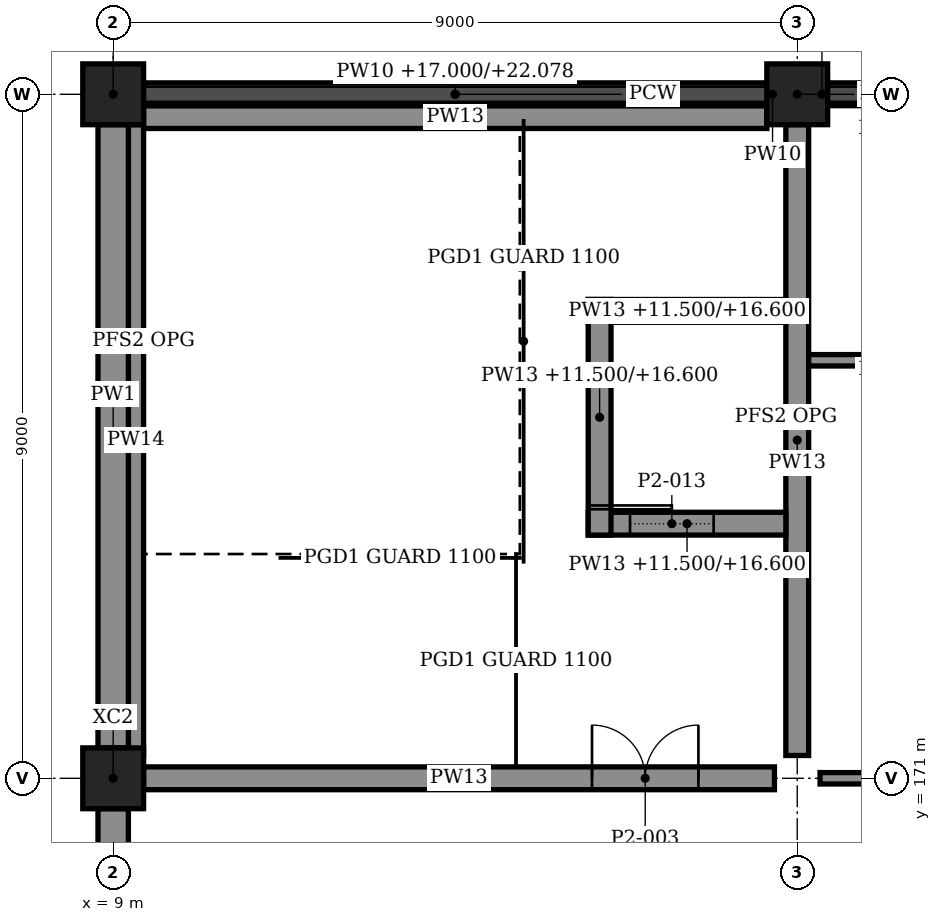
"""IFC4 building model, lengths in metres.
Left out: names, types, materials, properties, quantities, classifications, styles, units other than length and angle.
Written with IfcOpenShell. Run it as: python <this file> out.ifc"""

import sys

from ifc_helpers import new_model, si_unit, direction, frame, frame_2d, origin, origin_2d, place, context, subcontext, project, spatial, polyline, rectangle, outline, extrude, element, fill, save


model = new_model("IFC4")
c1 = context("Model", 3, precision=1e-05, world=origin(), true_north=direction((0.0, 1.0)))
c2 = subcontext(c1, "Body", "Model", "MODEL_VIEW")
j1 = project(units=[si_unit("LENGTHUNIT", "METRE"), si_unit("PLANEANGLEUNIT", "RADIAN")], contexts=[c1])
p1 = place(None, origin())
s1 = spatial("IfcSite", under=j1, at=p1, CompositionType="ELEMENT")
p2 = place(p1, origin())
s2 = spatial("IfcBuilding", under=s1, at=p2, CompositionType="ELEMENT")
p3 = place(p2, frame((0.0, 0.0, 11.5)))
s3 = spatial("IfcBuildingStorey", under=s2, at=p3, CompositionType="ELEMENT", Elevation=11.5)
for number, where, z_axis, x_axis in (
    (1, (9.0, 171.0, 0.0), (0.0, 0.0, 1.0), (1.0, 0.0, 0.0)),
    (2, (9.0, 180.0, 0.0), (0.0, 0.0, 1.0), (1.0, 0.0, 0.0)),
    (3, (18.0, 180.0, 0.0), (0.0, 0.0, 1.0), (1.0, 0.0, 0.0)),
):
    element("IfcColumn", number, at=place(p3, frame(where, z_axis=z_axis, x_axis=x_axis)), inside=s3, PredefinedType="COLUMN", context=c2, shape_type="SweptSolid", body=[
        extrude(rectangle(XDim=0.8, YDim=0.8, at=origin_2d()), origin(), (0.0, 0.0, 1.0), 5.5),
    ])
p4 = place(p3, frame((9.0, 162.4, 0.0), z_axis=(0.0, 0.0, 1.0), x_axis=(0.0, 1.0, 0.0)))
e4 = element("IfcWall", 4, at=p4, inside=s3, PredefinedType="SOLIDWALL", context=c2, shape_type="SweptSolid", body=[
    extrude(outline(polyline([(0.0, 0.0), (8.2, 0.0), (8.2, 6.936), (0.0, 4.776), (0.0, 0.0)])), frame((0.0, 0.2, 0.0), z_axis=(0.0, -1.0, 0.0), x_axis=(1.0, 0.0, 0.0)), (0.0, 0.0, 1.0), 0.4),
])
p5 = place(p3, frame((9.0, 171.4, 0.0), z_axis=(0.0, 0.0, 1.0), x_axis=(0.0, 1.0, 0.0)))
e5 = element("IfcWall", 5, at=p5, inside=s3, PredefinedType="SOLIDWALL", context=c2, shape_type="SweptSolid", body=[
    extrude(outline(polyline([(0.0, 0.0), (8.2, 0.0), (8.2, 10.313), (0.0, 7.061), (0.0, 0.0)])), frame((0.0, 0.2, 0.0), z_axis=(0.0, -1.0, 0.0), x_axis=(1.0, 0.0, 0.0)), (0.0, 0.0, 1.0), 0.4),
])
p6 = place(p3, frame((9.4, 180.0, 5.5), z_axis=(0.0, 0.0, 1.0), x_axis=(1.0, 0.0, 0.0)))
e6 = element("IfcWall", 6, at=p6, inside=s3, PredefinedType="STANDARD", context=c2, shape_type="SweptSolid", body=[
    extrude(outline(polyline([(0.0, 0.0), (8.2, 0.0), (8.2, 8.316), (0.0, 5.078), (0.0, 0.0)])), frame((0.0, 0.15, 0.0), z_axis=(0.0, -1.0, 0.0), x_axis=(1.0, 0.0, 0.0)), (0.0, 0.0, 1.0), 0.3),
])
p7 = place(p3, frame((17.6, 180.0, 13.969), z_axis=(0.0, 0.0, 1.0), x_axis=(1.0, 0.0, 0.0)))
e7 = element("IfcWall", 7, at=p7, inside=s3, PredefinedType="STANDARD", context=c2, shape_type="SweptSolid", body=[
    extrude(rectangle(XDim=0.15, YDim=0.3, at=frame_2d((0.075, 0.0))), origin(), (0.0, 0.0, 1.0), 0.4),
])
p8 = place(p3, frame((18.4, 180.0, 5.5), z_axis=(0.0, 0.0, 1.0), x_axis=(1.0, 0.0, 0.0)))
e8 = element("IfcWall", 8, at=p8, inside=s3, PredefinedType="STANDARD", context=c2, shape_type="SweptSolid", body=[
    extrude(outline(polyline([(0.0, 0.0), (8.2, 0.0), (8.2, 10.653), (0.0, 8.494), (0.0, 0.0)])), frame((0.0, 0.15, 0.0), z_axis=(0.0, -1.0, 0.0), x_axis=(1.0, 0.0, 0.0)), (0.0, 0.0, 1.0), 0.3),
])
p9 = place(p3, frame((18.25, 180.0, 13.969), z_axis=(0.0, 0.0, 1.0), x_axis=(1.0, 0.0, 0.0)))
e9 = element("IfcWall", 9, at=p9, inside=s3, PredefinedType="STANDARD", context=c2, shape_type="SweptSolid", body=[
    extrude(rectangle(XDim=0.15, YDim=0.3, at=frame_2d((0.075, 0.0))), origin(), (0.0, 0.0, 1.0), 0.4),
])
p10 = place(p3, frame((18.0, 171.3, 0.0), z_axis=(0.0, 0.0, 1.0), x_axis=(0.0, 1.0, 0.0)))
e10 = element("IfcWall", 10, at=p10, inside=s3, PredefinedType="SOLIDWALL", context=c2, shape_type="SweptSolid", body=[
    extrude(rectangle(XDim=8.3, YDim=0.3, at=frame_2d((4.15, 0.0))), origin(), (0.0, 0.0, 1.0), 2.5),
])
p11 = place(p3, frame((9.4, 171.0, 0.0), z_axis=(0.0, 0.0, 1.0), x_axis=(1.0, 0.0, 0.0)))
e11 = element("IfcWall", 11, at=p11, inside=s3, PredefinedType="SOLIDWALL", context=c2, shape_type="SweptSolid", body=[
    extrude(rectangle(XDim=8.3, YDim=0.3, at=frame_2d((4.15, 0.0))), origin(), (0.0, 0.0, 1.0), 2.5),
])
p12 = place(p11, frame((5.9, 0.0, 0.0)))
e12 = element("IfcOpeningElement", 12, at=p12, cuts=e11, PredefinedType="OPENING", context=c2, shape_type="SweptSolid", body=[
    extrude(rectangle(XDim=1.4, YDim=2.4, at=frame_2d((0.7, 1.2))), frame((0.0, 0.16, 0.0), z_axis=(0.0, -1.0, 0.0), x_axis=(1.0, 0.0, 0.0)), (0.0, 0.0, 1.0), 0.32),
])
p13 = place(p3, frame((9.3, 171.3, 0.0), z_axis=(0.0, 0.0, 1.0), x_axis=(0.0, 1.0, 0.0)))
e13 = element("IfcWall", 13, at=p13, inside=s3, PredefinedType="SOLIDWALL", context=c2, shape_type="SweptSolid", body=[
    extrude(rectangle(XDim=8.3, YDim=0.2, at=frame_2d((4.15, 0.0))), origin(), (0.0, 0.0, 1.0), 2.5),
])
p14 = place(p3, frame((9.4, 179.7, 0.0), z_axis=(0.0, 0.0, 1.0), x_axis=(1.0, 0.0, 0.0)))
e14 = element("IfcWall", 14, at=p14, inside=s3, PredefinedType="SOLIDWALL", context=c2, shape_type="SweptSolid", body=[
    extrude(rectangle(XDim=8.2, YDim=0.3, at=frame_2d((4.1, 0.0))), origin(), (0.0, 0.0, 1.0), 2.5),
])
p15 = place(p3, frame((18.3, 171.0, 0.0), z_axis=(0.0, 0.0, 1.0), x_axis=(1.0, 0.0, 0.0)))
e15 = element("IfcWall", 15, at=p15, inside=s3, PredefinedType="PARTITIONING", context=c2, shape_type="SweptSolid", body=[
    extrude(rectangle(XDim=8.625, YDim=0.15, at=frame_2d((4.312, 0.0))), origin(), (0.0, 0.0, 1.0), 2.5),
])
p16 = place(p15, frame((6.2, 0.0, 0.0)))
e16 = element("IfcOpeningElement", 16, at=p16, cuts=e15, PredefinedType="OPENING", context=c2, shape_type="SweptSolid", body=[
    extrude(rectangle(XDim=1.0, YDim=2.4, at=frame_2d((0.5, 1.2))), frame((0.0, 0.085, 0.0), z_axis=(0.0, -1.0, 0.0), x_axis=(1.0, 0.0, 0.0)), (0.0, 0.0, 1.0), 0.17),
])
p17 = place(p3, frame((18.15, 176.5, 0.0), z_axis=(0.0, 0.0, 1.0), x_axis=(1.0, 0.0, 0.0)))
e17 = element("IfcWall", 17, at=p17, inside=s3, PredefinedType="PARTITIONING", context=c2, shape_type="SweptSolid", body=[
    extrude(rectangle(XDim=8.775, YDim=0.15, at=frame_2d((4.388, 0.0))), origin(), (0.0, 0.0, 1.0), 2.5),
])
p18 = place(p3, frame((15.4, 174.2, 0.0), z_axis=(0.0, 0.0, 1.0), x_axis=(0.0, 1.0, 0.0)))
e18 = element("IfcWall", 18, at=p18, inside=s3, PredefinedType="SOLIDWALL", context=c2, shape_type="SweptSolid", body=[
    extrude(rectangle(XDim=3.1, YDim=0.3, at=frame_2d((1.55, 0.0))), origin(), (0.0, 0.0, 1.0), 5.1),
])
p19 = place(p3, frame((15.25, 174.35, 0.0), z_axis=(0.0, 0.0, 1.0), x_axis=(1.0, 0.0, 0.0)))
e19 = element("IfcWall", 19, at=p19, inside=s3, PredefinedType="SOLIDWALL", context=c2, shape_type="SweptSolid", body=[
    extrude(rectangle(XDim=2.6, YDim=0.3, at=frame_2d((1.3, 0.0))), origin(), (0.0, 0.0, 1.0), 5.1),
])
p20 = place(p19, frame((0.55, 0.0, 0.0)))
e20 = element("IfcOpeningElement", 20, at=p20, cuts=e19, PredefinedType="OPENING", context=c2, shape_type="SweptSolid", body=[
    extrude(rectangle(XDim=1.1, YDim=2.1, at=frame_2d((0.55, 1.05))), frame((0.0, 0.16, 0.0), z_axis=(0.0, -1.0, 0.0), x_axis=(1.0, 0.0, 0.0)), (0.0, 0.0, 1.0), 0.32),
])
p21 = place(p3, frame((15.25, 177.15, 0.0), z_axis=(0.0, 0.0, 1.0), x_axis=(1.0, 0.0, 0.0)))
e21 = element("IfcWall", 21, at=p21, inside=s3, PredefinedType="SOLIDWALL", context=c2, shape_type="SweptSolid", body=[
    extrude(rectangle(XDim=2.6, YDim=0.3, at=frame_2d((1.3, 0.0))), origin(), (0.0, 0.0, 1.0), 5.1),
])
p22 = place(p12, origin())
e22 = element("IfcDoor", 22, at=p22, inside=s3, OperationType="SINGLE_SWING_LEFT", PredefinedType="DOOR", context=c2, shape_type="SweptSolid", body=[
    extrude(rectangle(XDim=1.4, YDim=2.4, at=frame_2d((0.7, 1.2))), frame((0.0, 0.025, 0.0), z_axis=(0.0, -1.0, 0.0), x_axis=(1.0, 0.0, 0.0)), (0.0, 0.0, 1.0), 0.05),
])
fill(e12, e22)
p23 = place(p20, origin())
e23 = element("IfcDoor", 23, at=p23, inside=s3, OperationType="SLIDING_TO_LEFT", PredefinedType="DOOR", context=c2, shape_type="SweptSolid", body=[
    extrude(rectangle(XDim=1.1, YDim=2.1, at=frame_2d((0.55, 1.05))), frame((0.0, 0.025, 0.0), z_axis=(0.0, -1.0, 0.0), x_axis=(1.0, 0.0, 0.0)), (0.0, 0.0, 1.0), 0.05),
])
fill(e20, e23)
save(model, sys.argv[1])
